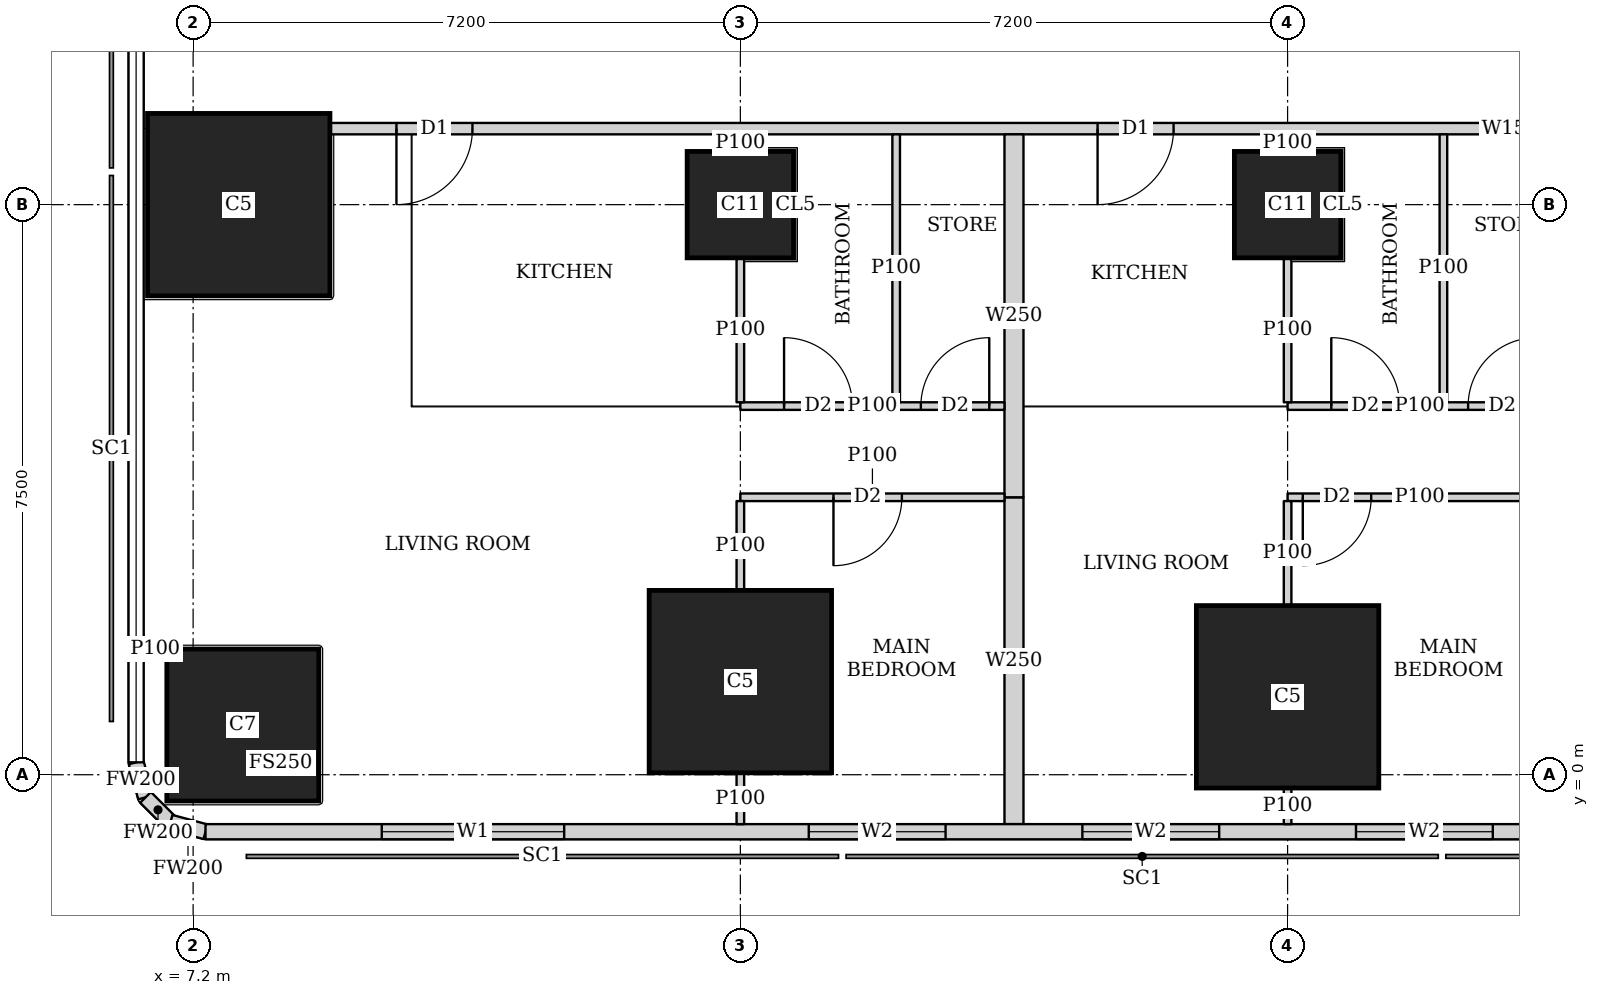
"""IFC4 building model, lengths in metres.
Left out: names, types, materials, properties, quantities, classifications, styles, units other than length and angle.
Written with IfcOpenShell. Run it as: python <this file> out.ifc"""

import sys

from ifc_helpers import new_model, si_unit, direction, frame, frame_2d, origin, origin_2d, place, context, subcontext, project, spatial, rectangle, extrude, element, fill, save


model = new_model("IFC4")
c1 = context("Model", 3, precision=1e-05, world=origin(), true_north=direction((0.0, 1.0)))
c2 = subcontext(c1, "Body", "Model", "MODEL_VIEW")
j1 = project(units=[si_unit("LENGTHUNIT", "METRE"), si_unit("PLANEANGLEUNIT", "RADIAN")], contexts=[c1])
p1 = place(None, origin())
s1 = spatial("IfcSite", under=j1, at=p1, CompositionType="ELEMENT")
p2 = place(p1, origin())
s2 = spatial("IfcBuilding", under=s1, at=p2, CompositionType="ELEMENT")
p3 = place(p2, frame((0.0, 0.0, 212.45)))
s3 = spatial("IfcBuildingStorey", under=s2, at=p3, CompositionType="ELEMENT", Elevation=212.45)
p4 = place(p3, frame((7.854, 0.654, 0.0), z_axis=(0.0, 0.0, 1.0), x_axis=(1.0, 0.0, 0.0)))
e1 = element("IfcColumn", 1, at=p4, inside=s3, PredefinedType="COLUMN", context=c2, shape_type="SweptSolid", body=[
    extrude(rectangle(XDim=2.0, YDim=2.0, at=origin_2d()), origin(), (0.0, 0.0, 1.0), 3.75),
])
for number, where, z_axis, x_axis in (
    (2, (14.4, 1.225, 0.0), (0.0, 0.0, 1.0), (1.0, 0.0, 0.0)),
    (3, (21.6, 1.025, 0.0), (0.0, 0.0, 1.0), (1.0, 0.0, 0.0)),
    (4, (7.8, 7.5, 0.0), (0.0, 0.0, 1.0), (1.0, 0.0, 0.0)),
):
    element("IfcColumn", number, at=place(p3, frame(where, z_axis=z_axis, x_axis=x_axis)), inside=s3, PredefinedType="COLUMN", context=c2, shape_type="SweptSolid", body=[
        extrude(rectangle(XDim=2.4, YDim=2.4, at=origin_2d()), origin(), (0.0, 0.0, 1.0), 3.75),
    ])
for number, where, z_axis, x_axis in (
    (5, (14.4, 7.5, 0.0), (0.0, 0.0, 1.0), (1.0, 0.0, 0.0)),
    (6, (21.6, 7.5, 0.0), (0.0, 0.0, 1.0), (1.0, 0.0, 0.0)),
):
    element("IfcColumn", number, at=place(p3, frame(where, z_axis=z_axis, x_axis=x_axis)), inside=s3, PredefinedType="COLUMN", context=c2, shape_type="SweptSolid", body=[
        extrude(rectangle(XDim=1.4, YDim=1.4, at=origin_2d()), origin(), (0.0, 0.0, 1.0), 3.75),
    ])
p5 = place(p3, frame((7.363, -0.75, 0.0), z_axis=(0.0, 0.0, 1.0), x_axis=(1.0, 0.0, 0.0)))
e7 = element("IfcWall", 7, at=p5, inside=s3, PredefinedType="SOLIDWALL", context=c2, shape_type="SweptSolid", body=[
    extrude(rectangle(XDim=40.428, YDim=0.2, at=frame_2d((20.214, 0.0))), origin(), (0.0, 0.0, 1.0), 3.5),
])
p6 = place(p5, frame((2.319, 0.0, 0.9)))
e8 = element("IfcOpeningElement", 8, at=p6, cuts=e7, PredefinedType="OPENING", context=c2, shape_type="SweptSolid", body=[
    extrude(rectangle(XDim=2.4, YDim=1.5, at=frame_2d((1.2, 0.75))), frame((0.0, 0.11, 0.0), z_axis=(0.0, -1.0, 0.0), x_axis=(1.0, 0.0, 0.0)), (0.0, 0.0, 1.0), 0.22),
])
p7 = place(p5, frame((7.937, 0.0, 0.9)))
e9 = element("IfcOpeningElement", 9, at=p7, cuts=e7, PredefinedType="OPENING", context=c2, shape_type="SweptSolid", body=[
    extrude(rectangle(XDim=1.8, YDim=1.5, at=frame_2d((0.9, 0.75))), frame((0.0, 0.11, 0.0), z_axis=(0.0, -1.0, 0.0), x_axis=(1.0, 0.0, 0.0)), (0.0, 0.0, 1.0), 0.22),
])
p8 = place(p5, frame((11.537, 0.0, 0.9)))
e10 = element("IfcOpeningElement", 10, at=p8, cuts=e7, PredefinedType="OPENING", context=c2, shape_type="SweptSolid", body=[
    extrude(rectangle(XDim=1.8, YDim=1.5, at=frame_2d((0.9, 0.75))), frame((0.0, 0.11, 0.0), z_axis=(0.0, -1.0, 0.0), x_axis=(1.0, 0.0, 0.0)), (0.0, 0.0, 1.0), 0.22),
])
p9 = place(p5, frame((15.137, 0.0, 0.9)))
e11 = element("IfcOpeningElement", 11, at=p9, cuts=e7, PredefinedType="OPENING", context=c2, shape_type="SweptSolid", body=[
    extrude(rectangle(XDim=1.8, YDim=1.5, at=frame_2d((0.9, 0.75))), frame((0.0, 0.11, 0.0), z_axis=(0.0, -1.0, 0.0), x_axis=(1.0, 0.0, 0.0)), (0.0, 0.0, 1.0), 0.22),
])
p10 = place(p5, frame((18.737, 0.0, 0.9)))
e12 = element("IfcOpeningElement", 12, at=p10, cuts=e7, PredefinedType="OPENING", context=c2, shape_type="SweptSolid", body=[
    extrude(rectangle(XDim=1.8, YDim=1.5, at=frame_2d((0.9, 0.75))), frame((0.0, 0.11, 0.0), z_axis=(0.0, -1.0, 0.0), x_axis=(1.0, 0.0, 0.0)), (0.0, 0.0, 1.0), 0.22),
])
p11 = place(p5, frame((22.337, 0.0, 0.9)))
e13 = element("IfcOpeningElement", 13, at=p11, cuts=e7, PredefinedType="OPENING", context=c2, shape_type="SweptSolid", body=[
    extrude(rectangle(XDim=1.8, YDim=1.5, at=frame_2d((0.9, 0.75))), frame((0.0, 0.11, 0.0), z_axis=(0.0, -1.0, 0.0), x_axis=(1.0, 0.0, 0.0)), (0.0, 0.0, 1.0), 0.22),
])
p12 = place(p5, frame((25.937, 0.0, 0.9)))
e14 = element("IfcOpeningElement", 14, at=p12, cuts=e7, PredefinedType="OPENING", context=c2, shape_type="SweptSolid", body=[
    extrude(rectangle(XDim=1.8, YDim=1.5, at=frame_2d((0.9, 0.75))), frame((0.0, 0.11, 0.0), z_axis=(0.0, -1.0, 0.0), x_axis=(1.0, 0.0, 0.0)), (0.0, 0.0, 1.0), 0.22),
])
p13 = place(p5, frame((29.537, 0.0, 0.9)))
e15 = element("IfcOpeningElement", 15, at=p13, cuts=e7, PredefinedType="OPENING", context=c2, shape_type="SweptSolid", body=[
    extrude(rectangle(XDim=1.8, YDim=1.5, at=frame_2d((0.9, 0.75))), frame((0.0, 0.11, 0.0), z_axis=(0.0, -1.0, 0.0), x_axis=(1.0, 0.0, 0.0)), (0.0, 0.0, 1.0), 0.22),
])
p14 = place(p3, frame((6.45, 0.163, 0.0), z_axis=(0.0, 0.0, 1.0), x_axis=(0.259698463175, -0.965689757751, 0.0)))
e16 = element("IfcWall", 16, at=p14, inside=s3, PredefinedType="SOLIDWALL", context=c2, shape_type="SweptSolid", body=[
    extrude(rectangle(XDim=0.478, YDim=0.2, at=frame_2d((0.239, 0.0))), origin(), (0.0, 0.0, 1.0), 3.5),
])
p15 = place(p3, frame((6.574, -0.298, 0.0), z_axis=(0.0, 0.0, 1.0), x_axis=(0.707369890659, -0.706843573776, 0.0)))
e17 = element("IfcWall", 17, at=p15, inside=s3, PredefinedType="SOLIDWALL", context=c2, shape_type="SweptSolid", body=[
    extrude(rectangle(XDim=0.464, YDim=0.2, at=frame_2d((0.232, 0.0))), origin(), (0.0, 0.0, 1.0), 3.5),
])
p16 = place(p3, frame((6.902, -0.626, 0.0), z_axis=(0.0, 0.0, 1.0), x_axis=(0.965655254015, -0.259826731483, 0.0)))
e18 = element("IfcWall", 18, at=p16, inside=s3, PredefinedType="SOLIDWALL", context=c2, shape_type="SweptSolid", body=[
    extrude(rectangle(XDim=0.477, YDim=0.2, at=frame_2d((0.239, 0.0))), origin(), (0.0, 0.0, 1.0), 3.5),
])
p17 = place(p3, frame((40.053, 8.5, 0.0), z_axis=(0.0, 0.0, 1.0), x_axis=(-1.0, 0.0, 0.0)))
e19 = element("IfcWall", 19, at=p17, inside=s3, PredefinedType="SOLIDWALL", context=c2, shape_type="SweptSolid", body=[
    extrude(rectangle(XDim=31.052, YDim=0.15, at=frame_2d((15.526, 0.0))), origin(), (0.0, 0.0, 1.0), 3.5),
])
p18 = place(p17, frame((29.178, 0.0, 0.0)))
e20 = element("IfcOpeningElement", 20, at=p18, cuts=e19, PredefinedType="OPENING", context=c2, shape_type="SweptSolid", body=[
    extrude(rectangle(XDim=1.0, YDim=2.1, at=frame_2d((0.5, 1.05))), frame((0.0, 0.085, 0.0), z_axis=(0.0, -1.0, 0.0), x_axis=(1.0, 0.0, 0.0)), (0.0, 0.0, 1.0), 0.17),
])
p19 = place(p17, frame((19.953, 0.0, 0.0)))
e21 = element("IfcOpeningElement", 21, at=p19, cuts=e19, PredefinedType="OPENING", context=c2, shape_type="SweptSolid", body=[
    extrude(rectangle(XDim=1.0, YDim=2.1, at=frame_2d((0.5, 1.05))), frame((0.0, 0.085, 0.0), z_axis=(0.0, -1.0, 0.0), x_axis=(1.0, 0.0, 0.0)), (0.0, 0.0, 1.0), 0.17),
])
p20 = place(p17, frame((12.753, 0.0, 0.0)))
e22 = element("IfcOpeningElement", 22, at=p20, cuts=e19, PredefinedType="OPENING", context=c2, shape_type="SweptSolid", body=[
    extrude(rectangle(XDim=1.0, YDim=2.1, at=frame_2d((0.5, 1.05))), frame((0.0, 0.085, 0.0), z_axis=(0.0, -1.0, 0.0), x_axis=(1.0, 0.0, 0.0)), (0.0, 0.0, 1.0), 0.17),
])
p21 = place(p17, frame((0.15, 0.0, 0.0)))
e23 = element("IfcOpeningElement", 23, at=p21, cuts=e19, PredefinedType="OPENING", context=c2, shape_type="SweptSolid", body=[
    extrude(rectangle(XDim=1.0, YDim=2.1, at=frame_2d((0.5, 1.05))), frame((0.0, 0.085, 0.0), z_axis=(0.0, -1.0, 0.0), x_axis=(1.0, 0.0, 0.0)), (0.0, 0.0, 1.0), 0.17),
])
p22 = place(p3, frame((6.55, 1.654, 0.0), z_axis=(0.0, 0.0, 1.0), x_axis=(1.0, 0.0, 0.0)))
e24 = element("IfcWall", 24, at=p22, inside=s3, PredefinedType="PARTITIONING", context=c2, shape_type="SweptSolid", body=[
    extrude(rectangle(XDim=0.304, YDim=0.1, at=frame_2d((0.152, 0.0))), origin(), (0.0, 0.0, 1.0), 2.05),
])
p23 = place(p3, frame((17.875, 3.65, 0.0), z_axis=(0.0, 0.0, 1.0), x_axis=(-1.0, 0.0, 0.0)))
e25 = element("IfcWall", 25, at=p23, inside=s3, PredefinedType="PARTITIONING", context=c2, shape_type="SweptSolid", body=[
    extrude(rectangle(XDim=3.475, YDim=0.1, at=frame_2d((1.738, 0.0))), origin(), (0.0, 0.0, 1.0), 3.5),
])
p24 = place(p23, frame((1.35, 0.0, 0.0)))
e26 = element("IfcOpeningElement", 26, at=p24, cuts=e25, PredefinedType="OPENING", context=c2, shape_type="SweptSolid", body=[
    extrude(rectangle(XDim=0.9, YDim=2.1, at=frame_2d((0.45, 1.05))), frame((0.0, 0.06, 0.0), z_axis=(0.0, -1.0, 0.0), x_axis=(1.0, 0.0, 0.0)), (0.0, 0.0, 1.0), 0.12),
])
p25 = place(p3, frame((17.875, 4.85, 0.0), z_axis=(0.0, 0.0, 1.0), x_axis=(-1.0, 0.0, 0.0)))
e27 = element("IfcWall", 27, at=p25, inside=s3, PredefinedType="PARTITIONING", context=c2, shape_type="SweptSolid", body=[
    extrude(rectangle(XDim=3.475, YDim=0.1, at=frame_2d((1.738, 0.0))), origin(), (0.0, 0.0, 1.0), 3.5),
])
p26 = place(p25, frame((2.0, 0.0, 0.0)))
e28 = element("IfcOpeningElement", 28, at=p26, cuts=e27, PredefinedType="OPENING", context=c2, shape_type="SweptSolid", body=[
    extrude(rectangle(XDim=0.9, YDim=2.1, at=frame_2d((0.45, 1.05))), frame((0.0, 0.06, 0.0), z_axis=(0.0, -1.0, 0.0), x_axis=(1.0, 0.0, 0.0)), (0.0, 0.0, 1.0), 0.12),
])
p27 = place(p25, frame((0.2, 0.0, 0.0)))
e29 = element("IfcOpeningElement", 29, at=p27, cuts=e27, PredefinedType="OPENING", context=c2, shape_type="SweptSolid", body=[
    extrude(rectangle(XDim=0.9, YDim=2.1, at=frame_2d((0.45, 1.05))), frame((0.0, 0.06, 0.0), z_axis=(0.0, -1.0, 0.0), x_axis=(1.0, 0.0, 0.0)), (0.0, 0.0, 1.0), 0.12),
])
p28 = place(p3, frame((14.4, -0.65, 0.0), z_axis=(0.0, 0.0, 1.0), x_axis=(0.0, 1.0, 0.0)))
e30 = element("IfcWall", 30, at=p28, inside=s3, PredefinedType="PARTITIONING", context=c2, shape_type="SweptSolid", body=[
    extrude(rectangle(XDim=0.674, YDim=0.1, at=frame_2d((0.337, 0.0))), origin(), (0.0, 0.0, 1.0), 3.5),
])
p29 = place(p3, frame((14.4, 2.426, 0.0), z_axis=(0.0, 0.0, 1.0), x_axis=(0.0, 1.0, 0.0)))
e31 = element("IfcWall", 31, at=p29, inside=s3, PredefinedType="PARTITIONING", context=c2, shape_type="SweptSolid", body=[
    extrude(rectangle(XDim=1.174, YDim=0.1, at=frame_2d((0.587, 0.0))), origin(), (0.0, 0.0, 1.0), 3.5),
])
p30 = place(p3, frame((14.4, 4.9, 0.0), z_axis=(0.0, 0.0, 1.0), x_axis=(0.0, 1.0, 0.0)))
e32 = element("IfcWall", 32, at=p30, inside=s3, PredefinedType="PARTITIONING", context=c2, shape_type="SweptSolid", body=[
    extrude(rectangle(XDim=1.899, YDim=0.1, at=frame_2d((0.95, 0.0))), origin(), (0.0, 0.0, 1.0), 3.5),
])
p31 = place(p3, frame((14.4, 8.201, 0.0), z_axis=(0.0, 0.0, 1.0), x_axis=(0.0, 1.0, 0.0)))
e33 = element("IfcWall", 33, at=p31, inside=s3, PredefinedType="PARTITIONING", context=c2, shape_type="SweptSolid", body=[
    extrude(rectangle(XDim=0.224, YDim=0.1, at=frame_2d((0.112, 0.0))), origin(), (0.0, 0.0, 1.0), 3.5),
])
p32 = place(p3, frame((16.45, 4.9, 0.0), z_axis=(0.0, 0.0, 1.0), x_axis=(0.0, 1.0, 0.0)))
e34 = element("IfcWall", 34, at=p32, inside=s3, PredefinedType="PARTITIONING", context=c2, shape_type="SweptSolid", body=[
    extrude(rectangle(XDim=3.525, YDim=0.1, at=frame_2d((1.763, 0.0))), origin(), (0.0, 0.0, 1.0), 3.5),
])
p33 = place(p3, frame((25.075, 3.65, 0.0), z_axis=(0.0, 0.0, 1.0), x_axis=(-1.0, 0.0, 0.0)))
e35 = element("IfcWall", 35, at=p33, inside=s3, PredefinedType="PARTITIONING", context=c2, shape_type="SweptSolid", body=[
    extrude(rectangle(XDim=3.475, YDim=0.1, at=frame_2d((1.737, 0.0))), origin(), (0.0, 0.0, 1.0), 3.5),
])
p34 = place(p33, frame((2.375, 0.0, 0.0)))
e36 = element("IfcOpeningElement", 36, at=p34, cuts=e35, PredefinedType="OPENING", context=c2, shape_type="SweptSolid", body=[
    extrude(rectangle(XDim=0.9, YDim=2.1, at=frame_2d((0.45, 1.05))), frame((0.0, 0.06, 0.0), z_axis=(0.0, -1.0, 0.0), x_axis=(1.0, 0.0, 0.0)), (0.0, 0.0, 1.0), 0.12),
])
p35 = place(p3, frame((25.075, 4.85, 0.0), z_axis=(0.0, 0.0, 1.0), x_axis=(-1.0, 0.0, 0.0)))
e37 = element("IfcWall", 37, at=p35, inside=s3, PredefinedType="PARTITIONING", context=c2, shape_type="SweptSolid", body=[
    extrude(rectangle(XDim=3.475, YDim=0.1, at=frame_2d((1.737, 0.0))), origin(), (0.0, 0.0, 1.0), 3.5),
])
p36 = place(p35, frame((2.0, 0.0, 0.0)))
e38 = element("IfcOpeningElement", 38, at=p36, cuts=e37, PredefinedType="OPENING", context=c2, shape_type="SweptSolid", body=[
    extrude(rectangle(XDim=0.9, YDim=2.1, at=frame_2d((0.45, 1.05))), frame((0.0, 0.06, 0.0), z_axis=(0.0, -1.0, 0.0), x_axis=(1.0, 0.0, 0.0)), (0.0, 0.0, 1.0), 0.12),
])
p37 = place(p35, frame((0.2, 0.0, 0.0)))
e39 = element("IfcOpeningElement", 39, at=p37, cuts=e37, PredefinedType="OPENING", context=c2, shape_type="SweptSolid", body=[
    extrude(rectangle(XDim=0.9, YDim=2.1, at=frame_2d((0.45, 1.05))), frame((0.0, 0.06, 0.0), z_axis=(0.0, -1.0, 0.0), x_axis=(1.0, 0.0, 0.0)), (0.0, 0.0, 1.0), 0.12),
])
p38 = place(p3, frame((21.6, -0.65, 0.0), z_axis=(0.0, 0.0, 1.0), x_axis=(0.0, 1.0, 0.0)))
e40 = element("IfcWall", 40, at=p38, inside=s3, PredefinedType="PARTITIONING", context=c2, shape_type="SweptSolid", body=[
    extrude(rectangle(XDim=0.474, YDim=0.1, at=frame_2d((0.237, 0.0))), origin(), (0.0, 0.0, 1.0), 3.5),
])
p39 = place(p3, frame((21.6, 2.226, 0.0), z_axis=(0.0, 0.0, 1.0), x_axis=(0.0, 1.0, 0.0)))
e41 = element("IfcWall", 41, at=p39, inside=s3, PredefinedType="PARTITIONING", context=c2, shape_type="SweptSolid", body=[
    extrude(rectangle(XDim=1.374, YDim=0.1, at=frame_2d((0.687, 0.0))), origin(), (0.0, 0.0, 1.0), 3.5),
])
p40 = place(p3, frame((21.6, 4.9, 0.0), z_axis=(0.0, 0.0, 1.0), x_axis=(0.0, 1.0, 0.0)))
e42 = element("IfcWall", 42, at=p40, inside=s3, PredefinedType="PARTITIONING", context=c2, shape_type="SweptSolid", body=[
    extrude(rectangle(XDim=1.899, YDim=0.1, at=frame_2d((0.95, 0.0))), origin(), (0.0, 0.0, 1.0), 3.5),
])
p41 = place(p3, frame((21.6, 8.201, 0.0), z_axis=(0.0, 0.0, 1.0), x_axis=(0.0, 1.0, 0.0)))
e43 = element("IfcWall", 43, at=p41, inside=s3, PredefinedType="PARTITIONING", context=c2, shape_type="SweptSolid", body=[
    extrude(rectangle(XDim=0.224, YDim=0.1, at=frame_2d((0.112, 0.0))), origin(), (0.0, 0.0, 1.0), 3.5),
])
p42 = place(p3, frame((23.65, 4.9, 0.0), z_axis=(0.0, 0.0, 1.0), x_axis=(0.0, 1.0, 0.0)))
e44 = element("IfcWall", 44, at=p42, inside=s3, PredefinedType="PARTITIONING", context=c2, shape_type="SweptSolid", body=[
    extrude(rectangle(XDim=3.525, YDim=0.1, at=frame_2d((1.763, 0.0))), origin(), (0.0, 0.0, 1.0), 3.5),
])
p43 = place(p3, frame((18.0, -0.65, 0.0), z_axis=(0.0, 0.0, 1.0), x_axis=(0.0, 1.0, 0.0)))
e45 = element("IfcWall", 45, at=p43, inside=s3, PredefinedType="SOLIDWALL", context=c2, shape_type="SweptSolid", body=[
    extrude(rectangle(XDim=4.3, YDim=0.25, at=frame_2d((2.15, 0.0))), origin(), (0.0, 0.0, 1.0), 2.05),
])
p44 = place(p3, frame((18.0, 3.65, 0.0), z_axis=(0.0, 0.0, 1.0), x_axis=(0.0, 1.0, 0.0)))
e46 = element("IfcWall", 46, at=p44, inside=s3, PredefinedType="SOLIDWALL", context=c2, shape_type="SweptSolid", body=[
    extrude(rectangle(XDim=4.775, YDim=0.25, at=frame_2d((2.388, 0.0))), origin(), (0.0, 0.0, 1.0), 3.5),
])
p45 = place(p6, origin())
e47 = element("IfcWindow", 47, at=p45, inside=s3, PartitioningType="SINGLE_PANEL", PredefinedType="WINDOW", context=c2, shape_type="SweptSolid", body=[
    extrude(rectangle(XDim=2.4, YDim=1.5, at=frame_2d((1.2, 0.75))), frame((0.0, 0.03, 0.0), z_axis=(0.0, -1.0, 0.0), x_axis=(1.0, 0.0, 0.0)), (0.0, 0.0, 1.0), 0.06),
])
fill(e8, e47)
p46 = place(p7, origin())
e48 = element("IfcWindow", 48, at=p46, inside=s3, PartitioningType="SINGLE_PANEL", PredefinedType="WINDOW", context=c2, shape_type="SweptSolid", body=[
    extrude(rectangle(XDim=1.8, YDim=1.5, at=frame_2d((0.9, 0.75))), frame((0.0, 0.03, 0.0), z_axis=(0.0, -1.0, 0.0), x_axis=(1.0, 0.0, 0.0)), (0.0, 0.0, 1.0), 0.06),
])
fill(e9, e48)
p47 = place(p8, origin())
e49 = element("IfcWindow", 49, at=p47, inside=s3, PartitioningType="SINGLE_PANEL", PredefinedType="WINDOW", context=c2, shape_type="SweptSolid", body=[
    extrude(rectangle(XDim=1.8, YDim=1.5, at=frame_2d((0.9, 0.75))), frame((0.0, 0.03, 0.0), z_axis=(0.0, -1.0, 0.0), x_axis=(1.0, 0.0, 0.0)), (0.0, 0.0, 1.0), 0.06),
])
fill(e10, e49)
p48 = place(p9, origin())
e50 = element("IfcWindow", 50, at=p48, inside=s3, PartitioningType="SINGLE_PANEL", PredefinedType="WINDOW", context=c2, shape_type="SweptSolid", body=[
    extrude(rectangle(XDim=1.8, YDim=1.5, at=frame_2d((0.9, 0.75))), frame((0.0, 0.03, 0.0), z_axis=(0.0, -1.0, 0.0), x_axis=(1.0, 0.0, 0.0)), (0.0, 0.0, 1.0), 0.06),
])
fill(e11, e50)
p49 = place(p24, origin())
e51 = element("IfcDoor", 51, at=p49, inside=s3, OperationType="SINGLE_SWING_RIGHT", PredefinedType="DOOR", context=c2, shape_type="SweptSolid", body=[
    extrude(rectangle(XDim=0.9, YDim=2.1, at=frame_2d((0.45, 1.05))), frame((0.0, 0.025, 0.0), z_axis=(0.0, -1.0, 0.0), x_axis=(1.0, 0.0, 0.0)), (0.0, 0.0, 1.0), 0.05),
])
fill(e26, e51)
p50 = place(p26, origin())
e52 = element("IfcDoor", 52, at=p50, inside=s3, OperationType="SINGLE_SWING_LEFT", PredefinedType="DOOR", context=c2, shape_type="SweptSolid", body=[
    extrude(rectangle(XDim=0.9, YDim=2.1, at=frame_2d((0.45, 1.05))), frame((0.0, 0.025, 0.0), z_axis=(0.0, -1.0, 0.0), x_axis=(1.0, 0.0, 0.0)), (0.0, 0.0, 1.0), 0.05),
])
fill(e28, e52)
p51 = place(p27, origin())
e53 = element("IfcDoor", 53, at=p51, inside=s3, OperationType="SINGLE_SWING_RIGHT", PredefinedType="DOOR", context=c2, shape_type="SweptSolid", body=[
    extrude(rectangle(XDim=0.9, YDim=2.1, at=frame_2d((0.45, 1.05))), frame((0.0, 0.025, 0.0), z_axis=(0.0, -1.0, 0.0), x_axis=(1.0, 0.0, 0.0)), (0.0, 0.0, 1.0), 0.05),
])
fill(e29, e53)
p52 = place(p18, origin())
e54 = element("IfcDoor", 54, at=p52, inside=s3, OperationType="SINGLE_SWING_RIGHT", PredefinedType="DOOR", context=c2, shape_type="SweptSolid", body=[
    extrude(rectangle(XDim=1.0, YDim=2.1, at=frame_2d((0.5, 1.05))), frame((0.0, 0.025, 0.0), z_axis=(0.0, -1.0, 0.0), x_axis=(1.0, 0.0, 0.0)), (0.0, 0.0, 1.0), 0.05),
])
fill(e20, e54)
p53 = place(p34, origin())
e55 = element("IfcDoor", 55, at=p53, inside=s3, OperationType="SINGLE_SWING_RIGHT", PredefinedType="DOOR", context=c2, shape_type="SweptSolid", body=[
    extrude(rectangle(XDim=0.9, YDim=2.1, at=frame_2d((0.45, 1.05))), frame((0.0, 0.025, 0.0), z_axis=(0.0, -1.0, 0.0), x_axis=(1.0, 0.0, 0.0)), (0.0, 0.0, 1.0), 0.05),
])
fill(e36, e55)
p54 = place(p36, origin())
e56 = element("IfcDoor", 56, at=p54, inside=s3, OperationType="SINGLE_SWING_LEFT", PredefinedType="DOOR", context=c2, shape_type="SweptSolid", body=[
    extrude(rectangle(XDim=0.9, YDim=2.1, at=frame_2d((0.45, 1.05))), frame((0.0, 0.025, 0.0), z_axis=(0.0, -1.0, 0.0), x_axis=(1.0, 0.0, 0.0)), (0.0, 0.0, 1.0), 0.05),
])
fill(e38, e56)
p55 = place(p37, origin())
e57 = element("IfcDoor", 57, at=p55, inside=s3, OperationType="SINGLE_SWING_RIGHT", PredefinedType="DOOR", context=c2, shape_type="SweptSolid", body=[
    extrude(rectangle(XDim=0.9, YDim=2.1, at=frame_2d((0.45, 1.05))), frame((0.0, 0.025, 0.0), z_axis=(0.0, -1.0, 0.0), x_axis=(1.0, 0.0, 0.0)), (0.0, 0.0, 1.0), 0.05),
])
fill(e39, e57)
p56 = place(p19, origin())
e58 = element("IfcDoor", 58, at=p56, inside=s3, OperationType="SINGLE_SWING_RIGHT", PredefinedType="DOOR", context=c2, shape_type="SweptSolid", body=[
    extrude(rectangle(XDim=1.0, YDim=2.1, at=frame_2d((0.5, 1.05))), frame((0.0, 0.025, 0.0), z_axis=(0.0, -1.0, 0.0), x_axis=(1.0, 0.0, 0.0)), (0.0, 0.0, 1.0), 0.05),
])
fill(e21, e58)
save(model, sys.argv[1])
